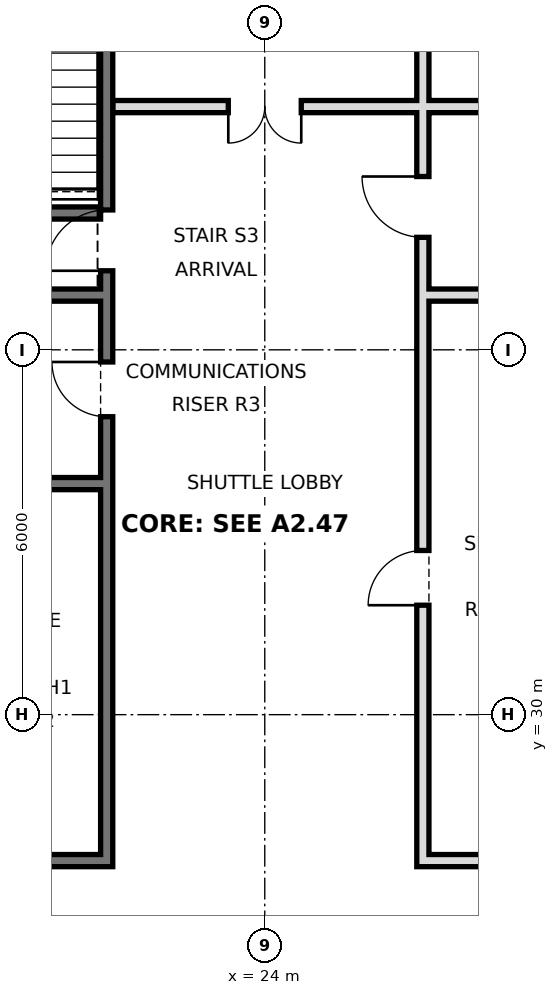
"""IFC4 building model, lengths in metres.
Left out: names, types, materials, properties, quantities, classifications, styles, units other than length and angle.
Written with IfcOpenShell. Run it as: python <this file> out.ifc"""

import sys

from ifc_helpers import new_model, si_unit, direction, frame, frame_2d, origin, place, context, subcontext, project, spatial, rectangle, extrude, element, fill, save


model = new_model("IFC4")
c1 = context("Model", 3, precision=1e-05, world=origin(), true_north=direction((0.0, 1.0)))
c2 = subcontext(c1, "Body", "Model", "MODEL_VIEW")
j1 = project(units=[si_unit("LENGTHUNIT", "METRE"), si_unit("PLANEANGLEUNIT", "RADIAN")], contexts=[c1])
p1 = place(None, origin())
s1 = spatial("IfcSite", under=j1, at=p1, CompositionType="ELEMENT")
p2 = place(p1, origin())
s2 = spatial("IfcBuilding", under=s1, at=p2, CompositionType="ELEMENT")
p3 = place(p2, frame((0.0, 0.0, 186.0)))
s3 = spatial("IfcBuildingStorey", under=s2, at=p3, CompositionType="ELEMENT", Elevation=186.0)
p4 = place(p3, frame((21.4, 27.5, 0.0), z_axis=(0.0, 0.0, 1.0), x_axis=(0.0, 1.0, 0.0)))
e1 = element("IfcWall", 1, at=p4, inside=s3, PredefinedType="SOLIDWALL", context=c2, shape_type="SweptSolid", body=[
    extrude(rectangle(XDim=17.5, YDim=0.2, at=frame_2d((8.75, 0.0))), origin(), (0.0, 0.0, 1.0), 5.7),
])
p5 = place(p4, frame((9.8, 0.0, 0.0)))
e2 = element("IfcOpeningElement", 2, at=p5, cuts=e1, PredefinedType="OPENING", context=c2, shape_type="SweptSolid", body=[
    extrude(rectangle(XDim=1.0, YDim=2.1, at=frame_2d((0.5, 1.05))), frame((0.0, 0.11, 0.0), z_axis=(0.0, -1.0, 0.0), x_axis=(1.0, 0.0, 0.0)), (0.0, 0.0, 1.0), 0.22),
])
p6 = place(p4, frame((16.2, 0.0, 0.0)))
e3 = element("IfcOpeningElement", 3, at=p6, cuts=e1, PredefinedType="OPENING", context=c2, shape_type="SweptSolid", body=[
    extrude(rectangle(XDim=1.0, YDim=2.1, at=frame_2d((0.5, 1.05))), frame((0.0, 0.11, 0.0), z_axis=(0.0, -1.0, 0.0), x_axis=(1.0, 0.0, 0.0)), (0.0, 0.0, 1.0), 0.22),
])
p7 = place(p4, frame((7.4, 0.0, 0.0)))
e4 = element("IfcOpeningElement", 4, at=p7, cuts=e1, PredefinedType="OPENING", context=c2, shape_type="SweptSolid", body=[
    extrude(rectangle(XDim=0.9, YDim=2.1, at=frame_2d((0.45, 1.05))), frame((0.0, 0.11, 0.0), z_axis=(0.0, -1.0, 0.0), x_axis=(1.0, 0.0, 0.0)), (0.0, 0.0, 1.0), 0.22),
])
p8 = place(p3, frame((26.6, 27.5, 0.0), z_axis=(0.0, 0.0, 1.0), x_axis=(0.0, 1.0, 0.0)))
e5 = element("IfcWall", 5, at=p8, inside=s3, PredefinedType="SOLIDWALL", context=c2, shape_type="SweptSolid", body=[
    extrude(rectangle(XDim=17.5, YDim=0.2, at=frame_2d((8.75, 0.0))), origin(), (0.0, 0.0, 1.0), 5.7),
])
p9 = place(p8, frame((4.3, 0.0, 0.0)))
e6 = element("IfcOpeningElement", 6, at=p9, cuts=e5, PredefinedType="OPENING", context=c2, shape_type="SweptSolid", body=[
    extrude(rectangle(XDim=0.9, YDim=2.1, at=frame_2d((0.45, 1.05))), frame((0.0, 0.11, 0.0), z_axis=(0.0, -1.0, 0.0), x_axis=(1.0, 0.0, 0.0)), (0.0, 0.0, 1.0), 0.22),
])
p10 = place(p8, frame((10.35, 0.0, 0.0)))
e7 = element("IfcOpeningElement", 7, at=p10, cuts=e5, PredefinedType="OPENING", context=c2, shape_type="SweptSolid", body=[
    extrude(rectangle(XDim=1.0, YDim=2.1, at=frame_2d((0.5, 1.05))), frame((0.0, 0.11, 0.0), z_axis=(0.0, -1.0, 0.0), x_axis=(1.0, 0.0, 0.0)), (0.0, 0.0, 1.0), 0.22),
])
p11 = place(p8, frame((14.575, 0.0, 0.0)))
e8 = element("IfcOpeningElement", 8, at=p11, cuts=e5, PredefinedType="OPENING", context=c2, shape_type="SweptSolid", body=[
    extrude(rectangle(XDim=1.0, YDim=2.1, at=frame_2d((0.5, 1.05))), frame((0.0, 0.11, 0.0), z_axis=(0.0, -1.0, 0.0), x_axis=(1.0, 0.0, 0.0)), (0.0, 0.0, 1.0), 0.22),
])
for number, where, z_axis, x_axis in (
    (9, (18.6, 27.6, 0.0), (0.0, 0.0, 1.0), (1.0, 0.0, 0.0)),
    (10, (26.7, 27.6, 0.0), (0.0, 0.0, 1.0), (1.0, 0.0, 0.0)),
    (11, (18.6, 33.8, 0.0), (0.0, 0.0, 1.0), (1.0, 0.0, 0.0)),
    (12, (18.6, 36.9, 0.0), (0.0, 0.0, 1.0), (1.0, 0.0, 0.0)),
    (13, (26.7, 36.9, 0.0), (0.0, 0.0, 1.0), (1.0, 0.0, 0.0)),
):
    element("IfcWall", number, at=place(p3, frame(where, z_axis=z_axis, x_axis=x_axis)), inside=s3, PredefinedType="SOLIDWALL", context=c2, shape_type="SweptSolid", body=[
        extrude(rectangle(XDim=2.7, YDim=0.2, at=frame_2d((1.35, 0.0))), origin(), (0.0, 0.0, 1.0), 5.7),
    ])
p12 = place(p3, frame((18.6, 38.25, 0.0), z_axis=(0.0, 0.0, 1.0), x_axis=(1.0, 0.0, 0.0)))
e14 = element("IfcWall", 14, at=p12, inside=s3, PredefinedType="SOLIDWALL", context=c2, shape_type="SweptSolid", body=[
    extrude(rectangle(XDim=2.7, YDim=0.2, at=frame_2d((1.35, 0.0))), origin(), (0.0, 0.0, 1.0), 2.8),
])
p13 = place(p3, frame((21.5, 40.0, 0.0), z_axis=(0.0, 0.0, 1.0), x_axis=(1.0, 0.0, 0.0)))
e15 = element("IfcWall", 15, at=p13, inside=s3, PredefinedType="PARTITIONING", context=c2, shape_type="SweptSolid", body=[
    extrude(rectangle(XDim=7.9, YDim=0.2, at=frame_2d((3.95, 0.0))), origin(), (0.0, 0.0, 1.0), 5.7),
])
p14 = place(p13, frame((1.9, 0.0, 0.0)))
e16 = element("IfcOpeningElement", 16, at=p14, cuts=e15, PredefinedType="OPENING", context=c2, shape_type="SweptSolid", body=[
    extrude(rectangle(XDim=1.2, YDim=2.1, at=frame_2d((0.6, 1.05))), frame((0.0, 0.11, 0.0), z_axis=(0.0, -1.0, 0.0), x_axis=(1.0, 0.0, 0.0)), (0.0, 0.0, 1.0), 0.22),
])
p15 = place(p14, frame((1.2, 0.0, 0.0), z_axis=(0.0, 0.0, 1.0), x_axis=(-1.0, 0.0, 0.0)))
e17 = element("IfcDoor", 17, at=p15, inside=s3, OperationType="DOUBLE_DOOR_SINGLE_SWING", PredefinedType="DOOR", context=c2, shape_type="SweptSolid", body=[
    extrude(rectangle(XDim=1.2, YDim=2.1, at=frame_2d((0.6, 1.05))), frame((0.0, 0.025, 0.0), z_axis=(0.0, -1.0, 0.0), x_axis=(1.0, 0.0, 0.0)), (0.0, 0.0, 1.0), 0.05),
])
fill(e16, e17)
p16 = place(p5, origin())
e18 = element("IfcDoor", 18, at=p16, inside=s3, OperationType="SINGLE_SWING_LEFT", PredefinedType="DOOR", context=c2, shape_type="SweptSolid", body=[
    extrude(rectangle(XDim=1.0, YDim=2.1, at=frame_2d((0.5, 1.05))), frame((0.0, 0.025, 0.0), z_axis=(0.0, -1.0, 0.0), x_axis=(1.0, 0.0, 0.0)), (0.0, 0.0, 1.0), 0.05),
])
fill(e2, e18)
p17 = place(p7, frame((0.9, 0.0, 0.0), z_axis=(0.0, 0.0, 1.0), x_axis=(-1.0, 0.0, 0.0)))
e19 = element("IfcDoor", 19, at=p17, inside=s3, OperationType="SINGLE_SWING_LEFT", PredefinedType="DOOR", context=c2, shape_type="SweptSolid", body=[
    extrude(rectangle(XDim=0.9, YDim=2.1, at=frame_2d((0.45, 1.05))), frame((0.0, 0.025, 0.0), z_axis=(0.0, -1.0, 0.0), x_axis=(1.0, 0.0, 0.0)), (0.0, 0.0, 1.0), 0.05),
])
fill(e4, e19)
p18 = place(p9, origin())
e20 = element("IfcDoor", 20, at=p18, inside=s3, OperationType="SINGLE_SWING_LEFT", PredefinedType="DOOR", context=c2, shape_type="SweptSolid", body=[
    extrude(rectangle(XDim=0.9, YDim=2.1, at=frame_2d((0.45, 1.05))), frame((0.0, 0.025, 0.0), z_axis=(0.0, -1.0, 0.0), x_axis=(1.0, 0.0, 0.0)), (0.0, 0.0, 1.0), 0.05),
])
fill(e6, e20)
p19 = place(p10, frame((1.0, 0.0, 0.0), z_axis=(0.0, 0.0, 1.0), x_axis=(-1.0, 0.0, 0.0)))
e21 = element("IfcDoor", 21, at=p19, inside=s3, OperationType="SINGLE_SWING_LEFT", PredefinedType="DOOR", context=c2, shape_type="SweptSolid", body=[
    extrude(rectangle(XDim=1.0, YDim=2.1, at=frame_2d((0.5, 1.05))), frame((0.0, 0.025, 0.0), z_axis=(0.0, -1.0, 0.0), x_axis=(1.0, 0.0, 0.0)), (0.0, 0.0, 1.0), 0.05),
])
fill(e7, e21)
save(model, sys.argv[1])
